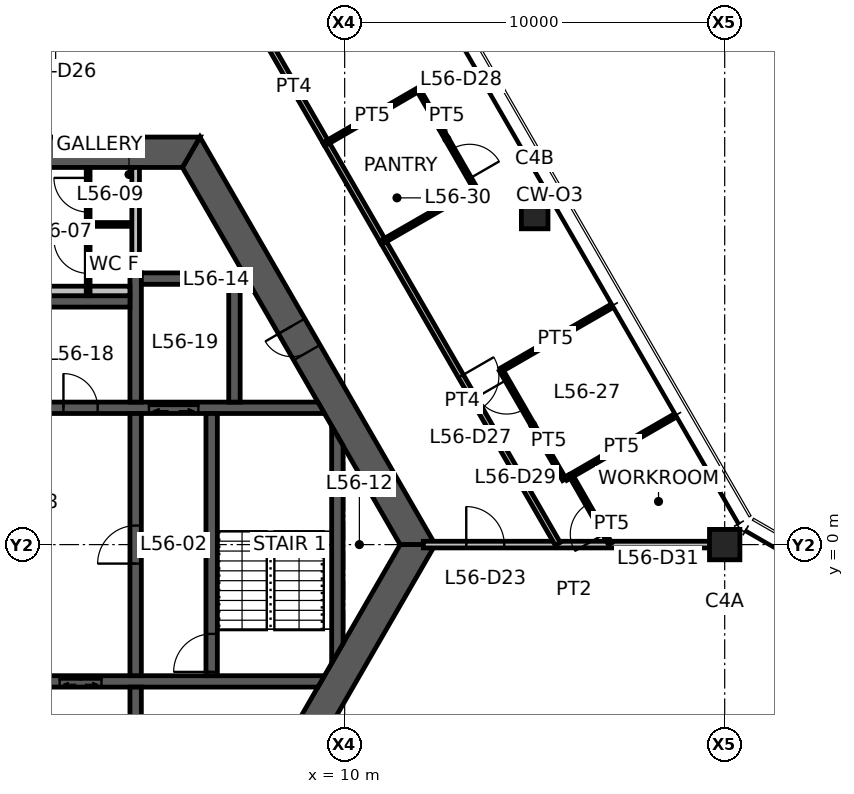
"""IFC4 building model, lengths in metres.
Left out: names, types, materials, properties, quantities, classifications, styles, units other than length and angle.
Written with IfcOpenShell. Run it as: python <this file> out.ifc"""

import sys

from ifc_helpers import new_model, si_unit, direction, frame, frame_2d, origin, origin_2d, place, context, subcontext, project, spatial, polyline, rectangle, hollow_rectangle, outline, extrude, element, fill, save


model = new_model("IFC4")
c1 = context("Model", 3, precision=1e-05, world=origin(), true_north=direction((0.0, 1.0)))
c2 = subcontext(c1, "Body", "Model", "MODEL_VIEW")
j1 = project(units=[si_unit("LENGTHUNIT", "METRE"), si_unit("PLANEANGLEUNIT", "RADIAN")], contexts=[c1])
p1 = place(None, origin())
s1 = spatial("IfcSite", under=j1, at=p1, CompositionType="ELEMENT")
p2 = place(p1, origin())
s2 = spatial("IfcBuilding", under=s1, at=p2, CompositionType="ELEMENT")
p3 = place(p2, frame((0.0, 0.0, 224.5)))
s3 = spatial("IfcBuildingStorey", under=s2, at=p3, CompositionType="ELEMENT", Elevation=224.5)
p4 = place(p3, frame((20.0, 0.0, 0.0), z_axis=(0.0, 0.0, 1.0), x_axis=(1.0, 0.0, 0.0)))
e1 = element("IfcColumn", 1, at=p4, inside=s3, PredefinedType="COLUMN", context=c2, shape_type="SweptSolid", body=[
    extrude(hollow_rectangle(XDim=0.8, YDim=0.8, WallThickness=0.04, at=origin_2d()), origin(), (0.0, 0.0, 1.0), 3.9),
])
p5 = place(p3, frame((15.0, 8.66, 0.0), z_axis=(0.0, 0.0, 1.0), x_axis=(1.0, 0.0, 0.0)))
e2 = element("IfcColumn", 2, at=p5, inside=s3, PredefinedType="COLUMN", context=c2, shape_type="SweptSolid", body=[
    extrude(hollow_rectangle(XDim=0.7, YDim=0.7, WallThickness=0.032, at=origin_2d()), origin(), (0.0, 0.0, 1.0), 3.9),
])
p6 = place(p3, frame((11.922, 0.0, 0.0), z_axis=(0.0, 0.0, 1.0), x_axis=(-0.500004296715, 0.866022923061, 0.0)))
e3 = element("IfcWall", 3, at=p6, inside=s3, PredefinedType="SHEAR", context=c2, shape_type="SweptSolid", body=[
    extrude(outline(polyline([(-0.231, -0.4), (5.835, -0.4), (6.635, -0.4), (12.153, -0.4), (11.691, 0.4), (6.635, 0.4), (5.835, 0.4), (0.231, 0.4), (-0.231, -0.4)])), origin(), (0.0, 0.0, 1.0), 3.9),
])
p7 = place(p6, frame((5.835, 0.0, 0.0)))
e4 = element("IfcOpeningElement", 4, at=p7, cuts=e3, PredefinedType="OPENING", context=c2, shape_type="SweptSolid", body=[
    extrude(rectangle(XDim=0.8, YDim=2.1, at=frame_2d((0.4, 1.05))), frame((0.0, 0.41, 0.0), z_axis=(0.0, -1.0, 0.0), x_axis=(1.0, 0.0, 0.0)), (0.0, 0.0, 1.0), 0.82),
])
p8 = place(p3, frame((5.961, 10.325, 0.0), z_axis=(0.0, 0.0, 1.0), x_axis=(-1.0, 0.0, 0.0)))
e5 = element("IfcWall", 5, at=p8, inside=s3, PredefinedType="SHEAR", context=c2, shape_type="SweptSolid", body=[
    extrude(outline(polyline([(-0.231, -0.4), (4.636, -0.4), (5.536, -0.4), (6.386, -0.4), (7.286, -0.4), (12.153, -0.4), (11.691, 0.4), (7.286, 0.4), (6.386, 0.4), (5.536, 0.4), (4.636, 0.4), (0.231, 0.4), (-0.231, -0.4)])), origin(), (0.0, 0.0, 1.0), 3.9),
])
p9 = place(p8, frame((6.386, 0.0, 0.0)))
e6 = element("IfcOpeningElement", 6, at=p9, cuts=e5, PredefinedType="OPENING", context=c2, shape_type="SweptSolid", body=[
    extrude(rectangle(XDim=0.9, YDim=2.1, at=frame_2d((0.45, 1.05))), frame((0.0, 0.41, 0.0), z_axis=(0.0, -1.0, 0.0), x_axis=(1.0, 0.0, 0.0)), (0.0, 0.0, 1.0), 0.82),
])
p10 = place(p8, frame((4.636, 0.0, 0.0)))
e7 = element("IfcOpeningElement", 7, at=p10, cuts=e5, PredefinedType="OPENING", context=c2, shape_type="SweptSolid", body=[
    extrude(rectangle(XDim=0.9, YDim=2.1, at=frame_2d((0.45, 1.05))), frame((0.0, 0.41, 0.0), z_axis=(0.0, -1.0, 0.0), x_axis=(1.0, 0.0, 0.0)), (0.0, 0.0, 1.0), 0.82),
])
p11 = place(p3, frame((5.961, -10.325, 0.0), z_axis=(0.0, 0.0, 1.0), x_axis=(0.500004296715, 0.866022923061, 0.0)))
e8 = element("IfcWall", 8, at=p11, inside=s3, PredefinedType="SHEAR", context=c2, shape_type="SweptSolid", body=[
    extrude(outline(polyline([(-0.231, -0.4), (4.594, -0.4), (5.394, -0.4), (12.153, -0.4), (11.691, 0.4), (5.394, 0.4), (4.594, 0.4), (0.231, 0.4), (-0.231, -0.4)])), origin(), (0.0, 0.0, 1.0), 3.9),
])
p12 = place(p11, frame((4.594, 0.0, 0.0)))
e9 = element("IfcOpeningElement", 9, at=p12, cuts=e8, PredefinedType="OPENING", context=c2, shape_type="SweptSolid", body=[
    extrude(rectangle(XDim=0.8, YDim=2.1, at=frame_2d((0.4, 1.05))), frame((0.0, 0.41, 0.0), z_axis=(0.0, -1.0, 0.0), x_axis=(1.0, 0.0, 0.0)), (0.0, 0.0, 1.0), 0.82),
])
p13 = place(p3, frame((1.45, 3.6, 0.0), z_axis=(0.0, 0.0, 1.0), x_axis=(1.0, 0.0, 0.0)))
e10 = element("IfcWall", 10, at=p13, inside=s3, PredefinedType="SHEAR", context=c2, shape_type="SweptSolid", body=[
    extrude(outline(polyline([(0.0, -0.15), (1.15, -0.15), (2.05, -0.15), (3.4, -0.15), (4.7, -0.15), (8.019, -0.15), (7.845, 0.15), (4.7, 0.15), (3.4, 0.15), (2.05, 0.15), (1.15, 0.15), (0.0, 0.15), (0.0, -0.15)])), origin(), (0.0, 0.0, 1.0), 3.9),
])
p14 = place(p13, frame((1.15, 0.0, 0.0)))
e11 = element("IfcOpeningElement", 11, at=p14, cuts=e10, PredefinedType="OPENING", context=c2, shape_type="SweptSolid", body=[
    extrude(rectangle(XDim=0.9, YDim=2.1, at=frame_2d((0.45, 1.05))), frame((0.0, 0.16, 0.0), z_axis=(0.0, -1.0, 0.0), x_axis=(1.0, 0.0, 0.0)), (0.0, 0.0, 1.0), 0.32),
])
p15 = place(p13, frame((3.4, 0.0, 0.0)))
e12 = element("IfcOpeningElement", 12, at=p15, cuts=e10, PredefinedType="OPENING", context=c2, shape_type="SweptSolid", body=[
    extrude(rectangle(XDim=1.3, YDim=2.1, at=frame_2d((0.65, 1.05))), frame((0.0, 0.16, 0.0), z_axis=(0.0, -1.0, 0.0), x_axis=(1.0, 0.0, 0.0)), (0.0, 0.0, 1.0), 0.32),
])
p16 = place(p3, frame((1.45, -3.6, 0.0), z_axis=(0.0, 0.0, 1.0), x_axis=(1.0, 0.0, 0.0)))
e13 = element("IfcWall", 13, at=p16, inside=s3, PredefinedType="SHEAR", context=c2, shape_type="SweptSolid", body=[
    extrude(outline(polyline([(0.0, -0.15), (1.05, -0.15), (2.15, -0.15), (7.845, -0.15), (8.019, 0.15), (2.15, 0.15), (1.05, 0.15), (0.0, 0.15), (0.0, -0.15)])), origin(), (0.0, 0.0, 1.0), 3.9),
])
p17 = place(p16, frame((1.05, 0.0, 0.0)))
e14 = element("IfcOpeningElement", 14, at=p17, cuts=e13, PredefinedType="OPENING", context=c2, shape_type="SweptSolid", body=[
    extrude(rectangle(XDim=1.1, YDim=2.1, at=frame_2d((0.55, 1.05))), frame((0.0, 0.16, 0.0), z_axis=(0.0, -1.0, 0.0), x_axis=(1.0, 0.0, 0.0)), (0.0, 0.0, 1.0), 0.32),
])
p18 = place(p3, frame((4.5, -3.45, 0.0), z_axis=(0.0, 0.0, 1.0), x_axis=(0.0, 1.0, 0.0)))
e15 = element("IfcWall", 15, at=p18, inside=s3, PredefinedType="SHEAR", context=c2, shape_type="SweptSolid", body=[
    extrude(rectangle(XDim=6.9, YDim=0.3, at=frame_2d((3.45, 0.0))), origin(), (0.0, 0.0, 1.0), 3.9),
])
p19 = place(p18, frame((2.95, 0.0, 0.0)))
e16 = element("IfcOpeningElement", 16, at=p19, cuts=e15, PredefinedType="OPENING", context=c2, shape_type="SweptSolid", body=[
    extrude(rectangle(XDim=1.0, YDim=2.1, at=frame_2d((0.5, 1.05))), frame((0.0, 0.16, 0.0), z_axis=(0.0, -1.0, 0.0), x_axis=(1.0, 0.0, 0.0)), (0.0, 0.0, 1.0), 0.32),
])
p20 = place(p3, frame((6.5, -3.45, 0.0), z_axis=(0.0, 0.0, 1.0), x_axis=(0.0, 1.0, 0.0)))
e17 = element("IfcWall", 17, at=p20, inside=s3, PredefinedType="SHEAR", context=c2, shape_type="SweptSolid", body=[
    extrude(rectangle(XDim=6.9, YDim=0.3, at=frame_2d((3.45, 0.0))), origin(), (0.0, 0.0, 1.0), 3.9),
])
p21 = place(p20, frame((0.1, 0.0, 0.0)))
e18 = element("IfcOpeningElement", 18, at=p21, cuts=e17, PredefinedType="OPENING", context=c2, shape_type="SweptSolid", body=[
    extrude(rectangle(XDim=1.0, YDim=2.1, at=frame_2d((0.5, 1.05))), frame((0.0, 0.16, 0.0), z_axis=(0.0, -1.0, 0.0), x_axis=(1.0, 0.0, 0.0)), (0.0, 0.0, 1.0), 0.32),
])
p22 = place(p3, frame((4.5, 3.75, 0.0), z_axis=(0.0, 0.0, 1.0), x_axis=(0.0, 1.0, 0.0)))
e19 = element("IfcWall", 19, at=p22, inside=s3, PredefinedType="SHEAR", context=c2, shape_type="SweptSolid", body=[
    extrude(rectangle(XDim=3.4, YDim=0.3, at=frame_2d((1.7, 0.0))), origin(), (0.0, 0.0, 1.0), 3.9),
])
p23 = place(p3, frame((4.5, -3.75, 0.0), z_axis=(0.0, 0.0, 1.0), x_axis=(0.0, -1.0, 0.0)))
e20 = element("IfcWall", 20, at=p23, inside=s3, PredefinedType="SHEAR", context=c2, shape_type="SweptSolid", body=[
    extrude(rectangle(XDim=6.175, YDim=0.3, at=frame_2d((3.087, 0.0))), origin(), (0.0, 0.0, 1.0), 3.9),
])
for number, where, z_axis, x_axis in (
    (21, (1.75, 6.4, 0.0), (0.0, 0.0, 1.0), (1.0, 0.0, 0.0)),
    (22, (4.65, 7.0, 0.0), (0.0, 0.0, 1.0), (1.0, 0.0, 0.0)),
):
    element("IfcWall", number, at=place(p3, frame(where, z_axis=z_axis, x_axis=x_axis)), inside=s3, PredefinedType="SHEAR", context=c2, shape_type="SweptSolid", body=[
        extrude(rectangle(XDim=2.6, YDim=0.3, at=frame_2d((1.3, 0.0))), origin(), (0.0, 0.0, 1.0), 3.9),
    ])
p24 = place(p3, frame((7.1, 3.75, 0.0), z_axis=(0.0, 0.0, 1.0), x_axis=(0.0, 1.0, 0.0)))
e23 = element("IfcWall", 23, at=p24, inside=s3, PredefinedType="SHEAR", context=c2, shape_type="SweptSolid", body=[
    extrude(rectangle(XDim=3.1, YDim=0.3, at=frame_2d((1.55, 0.0))), origin(), (0.0, 0.0, 1.0), 3.9),
])
p25 = place(p3, frame((9.808, -2.862, 0.0), z_axis=(0.0, 0.0, 1.0), x_axis=(0.0, 1.0, 0.0)))
e24 = element("IfcWall", 24, at=p25, inside=s3, PredefinedType="SHEAR", context=c2, shape_type="SweptSolid", body=[
    extrude(outline(polyline([(0.26, -0.15), (5.465, -0.15), (5.984, 0.15), (-0.26, 0.15), (0.26, -0.15)])), origin(), (0.0, 0.0, 1.0), 3.9),
])
p26 = place(p3, frame((4.5, 7.15, 0.0), z_axis=(0.0, 0.0, 1.0), x_axis=(0.0, 1.0, 0.0)))
e25 = element("IfcWall", 25, at=p26, inside=s3, PredefinedType="STANDARD", context=c2, shape_type="SweptSolid", body=[
    extrude(rectangle(XDim=2.775, YDim=0.2, at=frame_2d((1.388, 0.0))), origin(), (0.0, 0.0, 1.0), 3.9),
])
p27 = place(p3, frame((1.75, 6.675, 0.0), z_axis=(0.0, 0.0, 1.0), x_axis=(1.0, 0.0, 0.0)))
e26 = element("IfcWall", 26, at=p27, inside=s3, PredefinedType="PLUMBINGWALL", context=c2, shape_type="SweptSolid", body=[
    extrude(rectangle(XDim=2.6, YDim=0.25, at=frame_2d((1.3, 0.0))), origin(), (0.0, 0.0, 1.0), 3.9),
])
p28 = place(p3, frame((3.25, 6.55, 0.0), z_axis=(0.0, 0.0, 1.0), x_axis=(0.0, 1.0, 0.0)))
e27 = element("IfcWall", 27, at=p28, inside=s3, PredefinedType="PARTITIONING", context=c2, shape_type="SweptSolid", body=[
    extrude(rectangle(XDim=3.375, YDim=0.1, at=frame_2d((1.688, 0.0))), origin(), (0.0, 0.0, 1.0), 2.95),
])
p29 = place(p28, frame((0.587, 0.0, 0.0)))
e28 = element("IfcOpeningElement", 28, at=p29, cuts=e27, PredefinedType="OPENING", context=c2, shape_type="SweptSolid", body=[
    extrude(rectangle(XDim=0.9, YDim=2.1, at=frame_2d((0.45, 1.05))), frame((0.0, 0.06, 0.0), z_axis=(0.0, -1.0, 0.0), x_axis=(1.0, 0.0, 0.0)), (0.0, 0.0, 1.0), 0.12),
])
p30 = place(p28, frame((2.2, 0.0, 0.0)))
e29 = element("IfcOpeningElement", 29, at=p30, cuts=e27, PredefinedType="OPENING", context=c2, shape_type="SweptSolid", body=[
    extrude(rectangle(XDim=0.9, YDim=2.1, at=frame_2d((0.45, 1.05))), frame((0.0, 0.06, 0.0), z_axis=(0.0, -1.0, 0.0), x_axis=(1.0, 0.0, 0.0)), (0.0, 0.0, 1.0), 0.12),
])
p31 = place(p3, frame((3.3, 8.425, 0.0), z_axis=(0.0, 0.0, 1.0), x_axis=(1.0, 0.0, 0.0)))
e30 = element("IfcWall", 30, at=p31, inside=s3, PredefinedType="PARTITIONING", context=c2, shape_type="SweptSolid", body=[
    extrude(rectangle(XDim=1.05, YDim=0.1, at=frame_2d((0.525, 0.0))), origin(), (0.0, 0.0, 1.0), 2.95),
])
p32 = place(p3, frame((12.07, 0.0, 0.0), z_axis=(0.0, 0.0, 1.0), x_axis=(1.0, 0.0, 0.0)))
e31 = element("IfcWall", 31, at=p32, inside=s3, PredefinedType="PARTITIONING", context=c2, shape_type="SweptSolid", body=[
    extrude(rectangle(XDim=7.93, YDim=0.175, at=frame_2d((3.965, 0.0))), origin(), (0.0, 0.0, 1.0), 3.05),
])
p33 = place(p32, frame((1.13, 0.0, 0.0)))
e32 = element("IfcOpeningElement", 32, at=p33, cuts=e31, PredefinedType="OPENING", context=c2, shape_type="SweptSolid", body=[
    extrude(rectangle(XDim=1.0, YDim=2.1, at=frame_2d((0.5, 1.05))), frame((0.0, 0.098, 0.0), z_axis=(0.0, -1.0, 0.0), x_axis=(1.0, 0.0, 0.0)), (0.0, 0.0, 1.0), 0.195),
])
p34 = place(p3, frame((9.51, 10.577, 0.0), z_axis=(0.0, 0.0, 1.0), x_axis=(0.499977562641, -0.866038357612, 0.0)))
e33 = element("IfcWall", 33, at=p34, inside=s3, PredefinedType="PARTITIONING", context=c2, shape_type="SweptSolid", body=[
    extrude(rectangle(XDim=3.01, YDim=0.15, at=frame_2d((1.505, 0.0))), origin(), (0.0, 0.0, 1.0), 2.95),
])
p35 = place(p3, frame((7.809, 13.525, 0.0), z_axis=(0.0, 0.0, 1.0), x_axis=(0.500001088571, -0.866024775297, 0.0)))
e34 = element("IfcWall", 34, at=p35, inside=s3, PredefinedType="PARTITIONING", context=c2, shape_type="SweptSolid", body=[
    extrude(rectangle(XDim=3.413, YDim=0.15, at=frame_2d((1.707, 0.0))), origin(), (0.0, 0.0, 1.0), 2.95),
])
p36 = place(p3, frame((11.011, 7.979, 0.0), z_axis=(0.0, 0.0, 1.0), x_axis=(0.49999917462, -0.866025880317, 0.0)))
e35 = element("IfcWall", 35, at=p36, inside=s3, PredefinedType="PARTITIONING", context=c2, shape_type="SweptSolid", body=[
    extrude(rectangle(XDim=9.19, YDim=0.15, at=frame_2d((4.595, 0.0))), origin(), (0.0, 0.0, 1.0), 2.95),
])
p37 = place(p36, frame((4.095, 0.0, 0.0)))
e36 = element("IfcOpeningElement", 36, at=p37, cuts=e35, PredefinedType="OPENING", context=c2, shape_type="SweptSolid", body=[
    extrude(rectangle(XDim=1.0, YDim=2.1, at=frame_2d((0.5, 1.05))), frame((0.0, 0.085, 0.0), z_axis=(0.0, -1.0, 0.0), x_axis=(1.0, 0.0, 0.0)), (0.0, 0.0, 1.0), 0.17),
])
p38 = place(p3, frame((9.515, 10.569, 0.0), z_axis=(0.0, 0.0, 1.0), x_axis=(0.865255114713, 0.501331812737, 0.0)))
e37 = element("IfcWall", 37, at=p38, inside=s3, PredefinedType="PARTITIONING", context=c2, shape_type="SweptSolid", body=[
    extrude(rectangle(XDim=2.8, YDim=0.1, at=frame_2d((1.4, 0.0))), origin(), (0.0, 0.0, 1.0), 2.95),
])
p39 = place(p3, frame((11.938, 11.973, 0.0), z_axis=(0.0, 0.0, 1.0), x_axis=(0.50002537861, -0.866010750942, 0.0)))
e38 = element("IfcWall", 38, at=p39, inside=s3, PredefinedType="PARTITIONING", context=c2, shape_type="SweptSolid", body=[
    extrude(rectangle(XDim=3.0, YDim=0.1, at=frame_2d((1.5, 0.0))), origin(), (0.0, 0.0, 1.0), 2.95),
])
p40 = place(p39, frame((1.8, 0.0, 0.0)))
e39 = element("IfcOpeningElement", 39, at=p40, cuts=e38, PredefinedType="OPENING", context=c2, shape_type="SweptSolid", body=[
    extrude(rectangle(XDim=0.9, YDim=2.1, at=frame_2d((0.45, 1.05))), frame((0.0, 0.06, 0.0), z_axis=(0.0, -1.0, 0.0), x_axis=(1.0, 0.0, 0.0)), (0.0, 0.0, 1.0), 0.12),
])
p41 = place(p3, frame((13.438, 9.375, 0.0), z_axis=(0.0, 0.0, 1.0), x_axis=(-0.866817750494, -0.498625097071, 0.0)))
e40 = element("IfcWall", 40, at=p41, inside=s3, PredefinedType="PARTITIONING", context=c2, shape_type="SweptSolid", body=[
    extrude(rectangle(XDim=2.8, YDim=0.1, at=frame_2d((1.4, 0.0))), origin(), (0.0, 0.0, 1.0), 2.95),
])
p42 = place(p3, frame((18.62, 3.351, 0.0), z_axis=(0.0, 0.0, 1.0), x_axis=(-0.866043267704, -0.499969057507, 0.0)))
e41 = element("IfcWall", 41, at=p42, inside=s3, PredefinedType="PARTITIONING", context=c2, shape_type="SweptSolid", body=[
    extrude(rectangle(XDim=3.085, YDim=0.1, at=frame_2d((1.542, 0.0))), origin(), (0.0, 0.0, 1.0), 2.95),
])
p43 = place(p3, frame((14.114, 4.595, 0.0), z_axis=(0.0, 0.0, 1.0), x_axis=(0.866033287653, 0.49998634449, 0.0)))
e42 = element("IfcWall", 42, at=p43, inside=s3, PredefinedType="PARTITIONING", context=c2, shape_type="SweptSolid", body=[
    extrude(rectangle(XDim=3.31, YDim=0.1, at=frame_2d((1.655, 0.0))), origin(), (0.0, 0.0, 1.0), 2.95),
])
p44 = place(p3, frame((15.779, 1.71, 0.0), z_axis=(0.0, 0.0, 1.0), x_axis=(-0.500001606164, 0.866024476463, 0.0)))
e43 = element("IfcWall", 43, at=p44, inside=s3, PredefinedType="PARTITIONING", context=c2, shape_type="SweptSolid", body=[
    extrude(rectangle(XDim=3.331, YDim=0.1, at=frame_2d((1.666, 0.0))), origin(), (0.0, 0.0, 1.0), 2.95),
])
p45 = place(p44, frame((2.131, 0.0, 0.0)))
e44 = element("IfcOpeningElement", 44, at=p45, cuts=e43, PredefinedType="OPENING", context=c2, shape_type="SweptSolid", body=[
    extrude(rectangle(XDim=0.9, YDim=2.1, at=frame_2d((0.45, 1.05))), frame((0.0, 0.06, 0.0), z_axis=(0.0, -1.0, 0.0), x_axis=(1.0, 0.0, 0.0)), (0.0, 0.0, 1.0), 0.12),
])
p46 = place(p3, frame((16.986, 0.02, 0.0), z_axis=(0.0, 0.0, 1.0), x_axis=(-0.498096123952, 0.867121820337, 0.0)))
e45 = element("IfcWall", 45, at=p46, inside=s3, PredefinedType="PARTITIONING", context=c2, shape_type="SweptSolid", body=[
    extrude(rectangle(XDim=2.067, YDim=0.1, at=frame_2d((1.034, 0.0))), origin(), (0.0, 0.0, 1.0), 2.95),
])
p47 = place(p46, frame((0.3, 0.0, 0.0)))
e46 = element("IfcOpeningElement", 46, at=p47, cuts=e45, PredefinedType="OPENING", context=c2, shape_type="SweptSolid", body=[
    extrude(rectangle(XDim=0.9, YDim=2.1, at=frame_2d((0.45, 1.05))), frame((0.0, 0.06, 0.0), z_axis=(0.0, -1.0, 0.0), x_axis=(1.0, 0.0, 0.0)), (0.0, 0.0, 1.0), 0.12),
])
p48 = place(p3, frame((15.823, 1.735, 0.0), z_axis=(0.0, 0.0, 1.0), x_axis=(0.867234405398, 0.497900076415, 0.0)))
e47 = element("IfcWall", 47, at=p48, inside=s3, PredefinedType="PARTITIONING", context=c2, shape_type="SweptSolid", body=[
    extrude(rectangle(XDim=0.104, YDim=0.1, at=frame_2d((0.052, 0.0))), origin(), (0.0, 0.0, 1.0), 2.95),
])
p49 = place(p7, origin())
e48 = element("IfcDoor", 48, at=p49, inside=s3, OperationType="SINGLE_SWING_RIGHT", PredefinedType="DOOR", context=c2, shape_type="SweptSolid", body=[
    extrude(rectangle(XDim=0.8, YDim=2.1, at=frame_2d((0.4, 1.05))), frame((0.0, 0.025, 0.0), z_axis=(0.0, -1.0, 0.0), x_axis=(1.0, 0.0, 0.0)), (0.0, 0.0, 1.0), 0.05),
])
fill(e4, e48)
p50 = place(p19, origin())
e49 = element("IfcDoor", 49, at=p50, inside=s3, OperationType="SINGLE_SWING_LEFT", PredefinedType="DOOR", context=c2, shape_type="SweptSolid", body=[
    extrude(rectangle(XDim=1.0, YDim=2.1, at=frame_2d((0.5, 1.05))), frame((0.0, 0.025, 0.0), z_axis=(0.0, -1.0, 0.0), x_axis=(1.0, 0.0, 0.0)), (0.0, 0.0, 1.0), 0.05),
])
fill(e16, e49)
p51 = place(p21, origin())
e50 = element("IfcDoor", 50, at=p51, inside=s3, OperationType="SINGLE_SWING_LEFT", PredefinedType="DOOR", context=c2, shape_type="SweptSolid", body=[
    extrude(rectangle(XDim=1.0, YDim=2.1, at=frame_2d((0.5, 1.05))), frame((0.0, 0.025, 0.0), z_axis=(0.0, -1.0, 0.0), x_axis=(1.0, 0.0, 0.0)), (0.0, 0.0, 1.0), 0.05),
])
fill(e18, e50)
p52 = place(p14, origin())
e51 = element("IfcDoor", 51, at=p52, inside=s3, OperationType="SINGLE_SWING_LEFT", PredefinedType="DOOR", context=c2, shape_type="SweptSolid", body=[
    extrude(rectangle(XDim=0.9, YDim=2.1, at=frame_2d((0.45, 1.05))), frame((0.0, 0.025, 0.0), z_axis=(0.0, -1.0, 0.0), x_axis=(1.0, 0.0, 0.0)), (0.0, 0.0, 1.0), 0.05),
])
fill(e11, e51)
p53 = place(p29, origin())
e52 = element("IfcDoor", 52, at=p53, inside=s3, OperationType="SINGLE_SWING_RIGHT", PredefinedType="DOOR", context=c2, shape_type="SweptSolid", body=[
    extrude(rectangle(XDim=0.9, YDim=2.1, at=frame_2d((0.45, 1.05))), frame((0.0, 0.025, 0.0), z_axis=(0.0, -1.0, 0.0), x_axis=(1.0, 0.0, 0.0)), (0.0, 0.0, 1.0), 0.05),
])
fill(e28, e52)
p54 = place(p30, origin())
e53 = element("IfcDoor", 53, at=p54, inside=s3, OperationType="SINGLE_SWING_RIGHT", PredefinedType="DOOR", context=c2, shape_type="SweptSolid", body=[
    extrude(rectangle(XDim=0.9, YDim=2.1, at=frame_2d((0.45, 1.05))), frame((0.0, 0.025, 0.0), z_axis=(0.0, -1.0, 0.0), x_axis=(1.0, 0.0, 0.0)), (0.0, 0.0, 1.0), 0.05),
])
fill(e29, e53)
p55 = place(p33, origin())
e54 = element("IfcDoor", 54, at=p55, inside=s3, OperationType="SINGLE_SWING_LEFT", PredefinedType="DOOR", context=c2, shape_type="SweptSolid", body=[
    extrude(rectangle(XDim=1.0, YDim=2.1, at=frame_2d((0.5, 1.05))), frame((0.0, 0.025, 0.0), z_axis=(0.0, -1.0, 0.0), x_axis=(1.0, 0.0, 0.0)), (0.0, 0.0, 1.0), 0.05),
])
fill(e32, e54)
p56 = place(p37, origin())
e55 = element("IfcDoor", 55, at=p56, inside=s3, OperationType="SINGLE_SWING_LEFT", PredefinedType="DOOR", context=c2, shape_type="SweptSolid", body=[
    extrude(rectangle(XDim=1.0, YDim=2.1, at=frame_2d((0.5, 1.05))), frame((0.0, 0.025, 0.0), z_axis=(0.0, -1.0, 0.0), x_axis=(1.0, 0.0, 0.0)), (0.0, 0.0, 1.0), 0.05),
])
fill(e36, e55)
p57 = place(p40, origin())
e56 = element("IfcDoor", 56, at=p57, inside=s3, OperationType="SINGLE_SWING_RIGHT", PredefinedType="DOOR", context=c2, shape_type="SweptSolid", body=[
    extrude(rectangle(XDim=0.9, YDim=2.1, at=frame_2d((0.45, 1.05))), frame((0.0, 0.025, 0.0), z_axis=(0.0, -1.0, 0.0), x_axis=(1.0, 0.0, 0.0)), (0.0, 0.0, 1.0), 0.05),
])
fill(e39, e56)
p58 = place(p45, origin())
e57 = element("IfcDoor", 57, at=p58, inside=s3, OperationType="SINGLE_SWING_RIGHT", PredefinedType="DOOR", context=c2, shape_type="SweptSolid", body=[
    extrude(rectangle(XDim=0.9, YDim=2.1, at=frame_2d((0.45, 1.05))), frame((0.0, 0.025, 0.0), z_axis=(0.0, -1.0, 0.0), x_axis=(1.0, 0.0, 0.0)), (0.0, 0.0, 1.0), 0.05),
])
fill(e44, e57)
p59 = place(p47, origin())
e58 = element("IfcDoor", 58, at=p59, inside=s3, OperationType="SINGLE_SWING_LEFT", PredefinedType="DOOR", context=c2, shape_type="SweptSolid", body=[
    extrude(rectangle(XDim=0.9, YDim=2.1, at=frame_2d((0.45, 1.05))), frame((0.0, 0.025, 0.0), z_axis=(0.0, -1.0, 0.0), x_axis=(1.0, 0.0, 0.0)), (0.0, 0.0, 1.0), 0.05),
])
fill(e46, e58)
p60 = place(p17, origin())
e59 = element("IfcDoor", 59, at=p60, inside=s3, OperationType="DOUBLE_DOOR_SLIDING", PredefinedType="DOOR", context=c2, shape_type="SweptSolid", body=[
    extrude(rectangle(XDim=1.1, YDim=2.1, at=frame_2d((0.55, 1.05))), frame((0.0, 0.025, 0.0), z_axis=(0.0, -1.0, 0.0), x_axis=(1.0, 0.0, 0.0)), (0.0, 0.0, 1.0), 0.05),
])
fill(e14, e59)
p61 = place(p15, origin())
e60 = element("IfcDoor", 60, at=p61, inside=s3, OperationType="DOUBLE_DOOR_SLIDING", PredefinedType="DOOR", context=c2, shape_type="SweptSolid", body=[
    extrude(rectangle(XDim=1.3, YDim=2.1, at=frame_2d((0.65, 1.05))), frame((0.0, 0.025, 0.0), z_axis=(0.0, -1.0, 0.0), x_axis=(1.0, 0.0, 0.0)), (0.0, 0.0, 1.0), 0.05),
])
fill(e12, e60)
save(model, sys.argv[1])
